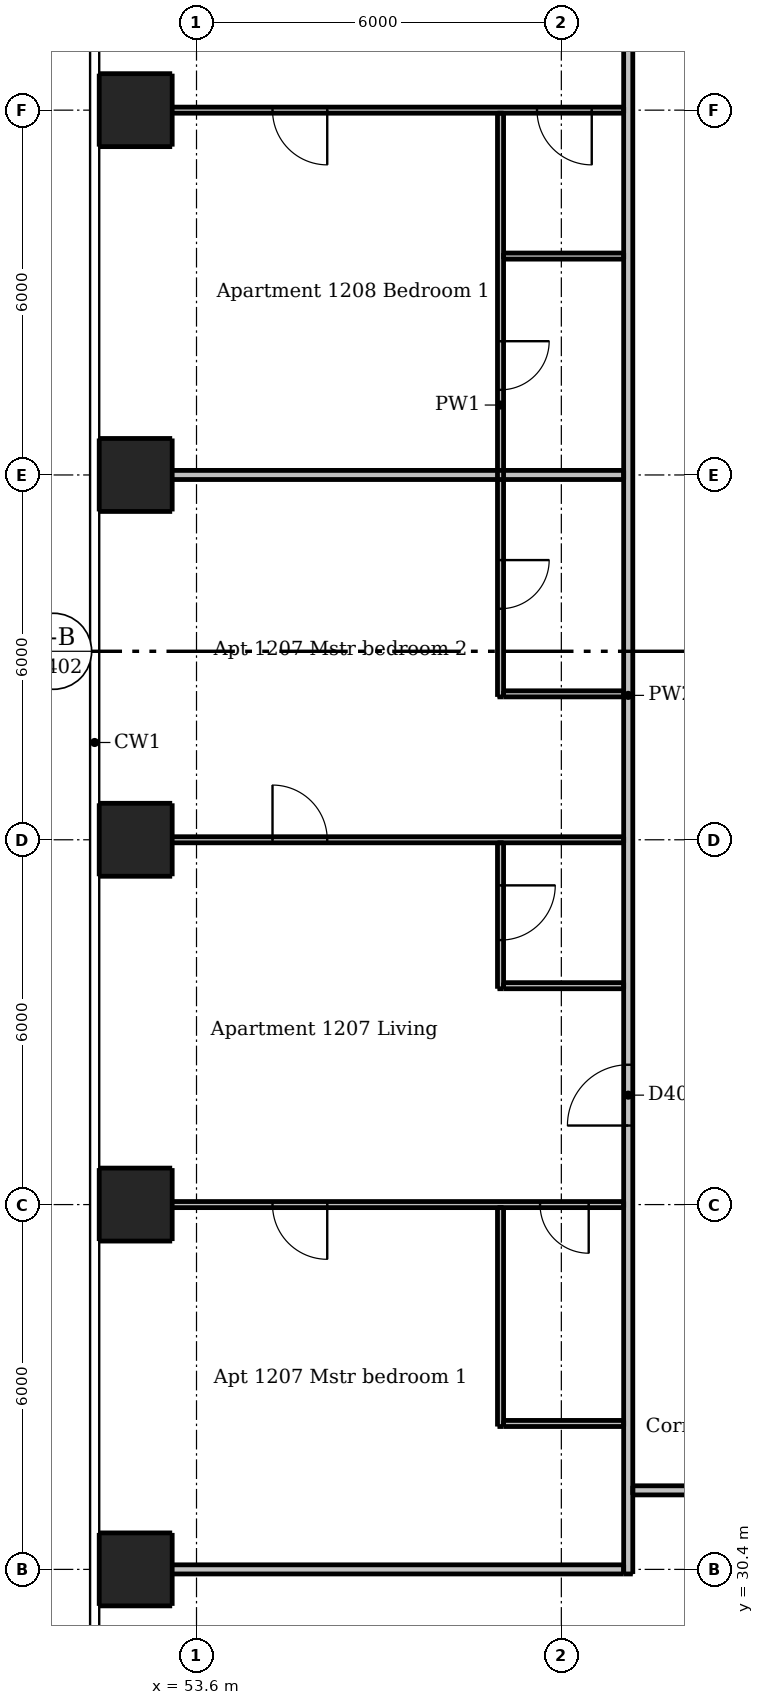
"""IFC4 building model, lengths in metres.
Left out: names, types, materials, properties, quantities, classifications, styles, units other than length and angle.
Written with IfcOpenShell. Run it as: python <this file> out.ifc"""

import sys

from ifc_helpers import new_model, si_unit, direction, frame, frame_2d, origin, origin_2d, place, context, subcontext, project, spatial, rectangle, extrude, element, fill, save


model = new_model("IFC4")
c1 = context("Model", 3, precision=1e-05, world=origin(), true_north=direction((0.0, 1.0)))
c2 = subcontext(c1, "Body", "Model", "MODEL_VIEW")
j1 = project(units=[si_unit("LENGTHUNIT", "METRE"), si_unit("PLANEANGLEUNIT", "RADIAN")], contexts=[c1])
p1 = place(None, origin())
s1 = spatial("IfcSite", under=j1, at=p1, CompositionType="ELEMENT")
p2 = place(p1, origin())
s2 = spatial("IfcBuilding", under=s1, at=p2, CompositionType="ELEMENT")
p3 = place(p2, frame((0.0, 0.0, 46.6)))
s3 = spatial("IfcBuildingStorey", under=s2, at=p3, CompositionType="ELEMENT", Elevation=46.6)
for number, where, z_axis, x_axis in (
    (1, (52.6, 30.4, 0.0), (0.0, 0.0, 1.0), (1.0, 0.0, 0.0)),
    (2, (52.6, 36.4, 0.0), (0.0, 0.0, 1.0), (1.0, 0.0, 0.0)),
    (3, (52.6, 42.4, 0.0), (0.0, 0.0, 1.0), (1.0, 0.0, 0.0)),
    (4, (52.6, 48.4, 0.0), (0.0, 0.0, 1.0), (1.0, 0.0, 0.0)),
    (5, (52.6, 54.4, 0.0), (0.0, 0.0, 1.0), (1.0, 0.0, 0.0)),
):
    element("IfcColumn", number, at=place(p3, frame(where, z_axis=z_axis, x_axis=x_axis)), inside=s3, PredefinedType="COLUMN", context=c2, shape_type="SweptSolid", body=[
        extrude(rectangle(XDim=1.2, YDim=1.2, at=origin_2d()), origin(), (0.0, 0.0, 1.0), 3.05),
    ])
p4 = place(p3, frame((58.6, 32.75, 0.0), z_axis=(0.0, 0.0, 1.0), x_axis=(0.0, 1.0, 0.0)))
e6 = element("IfcWall", 6, at=p4, inside=s3, PredefinedType="PARTITIONING", context=c2, shape_type="SweptSolid", body=[
    extrude(rectangle(XDim=3.6, YDim=0.1, at=frame_2d((1.8, 0.0))), origin(), (0.0, 0.0, 1.0), 3.05),
])
p5 = place(p3, frame((58.6, 42.35, 0.0), z_axis=(0.0, 0.0, 1.0), x_axis=(0.0, -1.0, 0.0)))
e7 = element("IfcWall", 7, at=p5, inside=s3, PredefinedType="PARTITIONING", context=c2, shape_type="SweptSolid", body=[
    extrude(rectangle(XDim=2.4, YDim=0.1, at=frame_2d((1.2, 0.0))), origin(), (0.0, 0.0, 1.0), 3.05),
])
p6 = place(p5, frame((0.7, 0.0, 0.0)))
e8 = element("IfcOpeningElement", 8, at=p6, cuts=e7, PredefinedType="OPENING", context=c2, shape_type="SweptSolid", body=[
    extrude(rectangle(XDim=0.9, YDim=2.1, at=frame_2d((0.45, 1.05))), frame((0.0, 0.06, 0.0), z_axis=(0.0, -1.0, 0.0), x_axis=(1.0, 0.0, 0.0)), (0.0, 0.0, 1.0), 0.12),
])
p7 = place(p3, frame((58.6, 54.35, 0.0), z_axis=(0.0, 0.0, 1.0), x_axis=(0.0, -1.0, 0.0)))
e9 = element("IfcWall", 9, at=p7, inside=s3, PredefinedType="PARTITIONING", context=c2, shape_type="SweptSolid", body=[
    extrude(rectangle(XDim=9.6, YDim=0.1, at=frame_2d((4.8, 0.0))), origin(), (0.0, 0.0, 1.0), 3.05),
])
p8 = place(p7, frame((7.35, 0.0, 0.0)))
e10 = element("IfcOpeningElement", 10, at=p8, cuts=e9, PredefinedType="OPENING", context=c2, shape_type="SweptSolid", body=[
    extrude(rectangle(XDim=0.8, YDim=2.1, at=frame_2d((0.4, 1.05))), frame((0.0, 0.06, 0.0), z_axis=(0.0, -1.0, 0.0), x_axis=(1.0, 0.0, 0.0)), (0.0, 0.0, 1.0), 0.12),
])
p9 = place(p7, frame((3.75, 0.0, 0.0)))
e11 = element("IfcOpeningElement", 11, at=p9, cuts=e9, PredefinedType="OPENING", context=c2, shape_type="SweptSolid", body=[
    extrude(rectangle(XDim=0.8, YDim=2.1, at=frame_2d((0.4, 1.05))), frame((0.0, 0.06, 0.0), z_axis=(0.0, -1.0, 0.0), x_axis=(1.0, 0.0, 0.0)), (0.0, 0.0, 1.0), 0.12),
])
p10 = place(p3, frame((60.625, 54.4, 0.0), z_axis=(0.0, 0.0, 1.0), x_axis=(-1.0, 0.0, 0.0)))
e12 = element("IfcWall", 12, at=p10, inside=s3, PredefinedType="PARTITIONING", context=c2, shape_type="SweptSolid", body=[
    extrude(rectangle(XDim=8.625, YDim=0.1, at=frame_2d((4.312, 0.0))), origin(), (0.0, 0.0, 1.0), 2.516),
])
p11 = place(p10, frame((0.525, 0.0, 0.0)))
e13 = element("IfcOpeningElement", 13, at=p11, cuts=e12, PredefinedType="OPENING", context=c2, shape_type="SweptSolid", body=[
    extrude(rectangle(XDim=0.9, YDim=2.1, at=frame_2d((0.45, 1.05))), frame((0.0, 0.06, 0.0), z_axis=(0.0, -1.0, 0.0), x_axis=(1.0, 0.0, 0.0)), (0.0, 0.0, 1.0), 0.12),
])
p12 = place(p10, frame((4.875, 0.0, 0.0)))
e14 = element("IfcOpeningElement", 14, at=p12, cuts=e12, PredefinedType="OPENING", context=c2, shape_type="SweptSolid", body=[
    extrude(rectangle(XDim=0.9, YDim=2.1, at=frame_2d((0.45, 1.05))), frame((0.0, 0.06, 0.0), z_axis=(0.0, -1.0, 0.0), x_axis=(1.0, 0.0, 0.0)), (0.0, 0.0, 1.0), 0.12),
])
for number, where, z_axis, x_axis in (
    (15, (58.65, 52.0, 0.0), (0.0, 0.0, 1.0), (1.0, 0.0, 0.0)),
    (16, (58.65, 44.8, 0.0), (0.0, 0.0, 1.0), (1.0, 0.0, 0.0)),
):
    element("IfcWall", number, at=place(p3, frame(where, z_axis=z_axis, x_axis=x_axis)), inside=s3, PredefinedType="PARTITIONING", context=c2, shape_type="SweptSolid", body=[
        extrude(rectangle(XDim=1.975, YDim=0.1, at=frame_2d((0.988, 0.0))), origin(), (0.0, 0.0, 1.0), 3.05),
    ])
p13 = place(p3, frame((52.0, 42.4, 0.0), z_axis=(0.0, 0.0, 1.0), x_axis=(1.0, 0.0, 0.0)))
e17 = element("IfcWall", 17, at=p13, inside=s3, PredefinedType="PARTITIONING", context=c2, shape_type="SweptSolid", body=[
    extrude(rectangle(XDim=8.625, YDim=0.1, at=frame_2d((4.312, 0.0))), origin(), (0.0, 0.0, 1.0), 2.516),
])
p14 = place(p13, frame((2.85, 0.0, 0.0)))
e18 = element("IfcOpeningElement", 18, at=p14, cuts=e17, PredefinedType="OPENING", context=c2, shape_type="SweptSolid", body=[
    extrude(rectangle(XDim=0.9, YDim=2.1, at=frame_2d((0.45, 1.05))), frame((0.0, 0.06, 0.0), z_axis=(0.0, -1.0, 0.0), x_axis=(1.0, 0.0, 0.0)), (0.0, 0.0, 1.0), 0.12),
])
p15 = place(p3, frame((58.65, 40.0, 0.0), z_axis=(0.0, 0.0, 1.0), x_axis=(1.0, 0.0, 0.0)))
e19 = element("IfcWall", 19, at=p15, inside=s3, PredefinedType="PARTITIONING", context=c2, shape_type="SweptSolid", body=[
    extrude(rectangle(XDim=1.975, YDim=0.1, at=frame_2d((0.988, 0.0))), origin(), (0.0, 0.0, 1.0), 3.05),
])
p16 = place(p3, frame((60.625, 36.4, 0.0), z_axis=(0.0, 0.0, 1.0), x_axis=(-1.0, 0.0, 0.0)))
e20 = element("IfcWall", 20, at=p16, inside=s3, PredefinedType="PARTITIONING", context=c2, shape_type="SweptSolid", body=[
    extrude(rectangle(XDim=8.625, YDim=0.1, at=frame_2d((4.312, 0.0))), origin(), (0.0, 0.0, 1.0), 2.516),
])
p17 = place(p16, frame((4.875, 0.0, 0.0)))
e21 = element("IfcOpeningElement", 21, at=p17, cuts=e20, PredefinedType="OPENING", context=c2, shape_type="SweptSolid", body=[
    extrude(rectangle(XDim=0.9, YDim=2.1, at=frame_2d((0.45, 1.05))), frame((0.0, 0.06, 0.0), z_axis=(0.0, -1.0, 0.0), x_axis=(1.0, 0.0, 0.0)), (0.0, 0.0, 1.0), 0.12),
])
p18 = place(p16, frame((0.575, 0.0, 0.0)))
e22 = element("IfcOpeningElement", 22, at=p18, cuts=e20, PredefinedType="OPENING", context=c2, shape_type="SweptSolid", body=[
    extrude(rectangle(XDim=0.8, YDim=2.1, at=frame_2d((0.4, 1.05))), frame((0.0, 0.06, 0.0), z_axis=(0.0, -1.0, 0.0), x_axis=(1.0, 0.0, 0.0)), (0.0, 0.0, 1.0), 0.12),
])
p19 = place(p3, frame((58.65, 32.8, 0.0), z_axis=(0.0, 0.0, 1.0), x_axis=(1.0, 0.0, 0.0)))
e23 = element("IfcWall", 23, at=p19, inside=s3, PredefinedType="PARTITIONING", context=c2, shape_type="SweptSolid", body=[
    extrude(rectangle(XDim=1.975, YDim=0.1, at=frame_2d((0.988, 0.0))), origin(), (0.0, 0.0, 1.0), 3.05),
])
p20 = place(p3, frame((60.7, 30.325, 0.0), z_axis=(0.0, 0.0, 1.0), x_axis=(0.0, 1.0, 0.0)))
e24 = element("IfcWall", 24, at=p20, inside=s3, PredefinedType="PARTITIONING", context=c2, shape_type="SweptSolid", body=[
    extrude(rectangle(XDim=28.9, YDim=0.15, at=frame_2d((14.45, 0.0))), origin(), (0.0, 0.0, 1.0), 3.05),
])
p21 = place(p20, frame((7.375, 0.0, 0.0)))
e25 = element("IfcOpeningElement", 25, at=p21, cuts=e24, PredefinedType="OPENING", context=c2, shape_type="SweptSolid", body=[
    extrude(rectangle(XDim=1.0, YDim=2.1, at=frame_2d((0.5, 1.05))), frame((0.0, 0.085, 0.0), z_axis=(0.0, -1.0, 0.0), x_axis=(1.0, 0.0, 0.0)), (0.0, 0.0, 1.0), 0.17),
])
p22 = place(p20, frame((26.025, 0.0, 0.0)))
e26 = element("IfcOpeningElement", 26, at=p22, cuts=e24, PredefinedType="OPENING", context=c2, shape_type="SweptSolid", body=[
    extrude(rectangle(XDim=1.0, YDim=2.1, at=frame_2d((0.5, 1.05))), frame((0.0, 0.085, 0.0), z_axis=(0.0, -1.0, 0.0), x_axis=(1.0, 0.0, 0.0)), (0.0, 0.0, 1.0), 0.17),
])
p23 = place(p3, frame((52.0, 48.4, 0.0), z_axis=(0.0, 0.0, 1.0), x_axis=(1.0, 0.0, 0.0)))
e27 = element("IfcWall", 27, at=p23, inside=s3, PredefinedType="PARTITIONING", context=c2, shape_type="SweptSolid", body=[
    extrude(rectangle(XDim=8.625, YDim=0.15, at=frame_2d((4.312, 0.0))), origin(), (0.0, 0.0, 1.0), 2.516),
])
p24 = place(p3, frame((89.525, 31.7, 0.0), z_axis=(0.0, 0.0, 1.0), x_axis=(-1.0, 0.0, 0.0)))
e28 = element("IfcWall", 28, at=p24, inside=s3, PredefinedType="PARTITIONING", context=c2, shape_type="SweptSolid", body=[
    extrude(rectangle(XDim=28.75, YDim=0.15, at=frame_2d((14.375, 0.0))), origin(), (0.0, 0.0, 1.0), 3.05),
])
p25 = place(p24, frame((24.325, 0.0, 0.0)))
e29 = element("IfcOpeningElement", 29, at=p25, cuts=e28, PredefinedType="OPENING", context=c2, shape_type="SweptSolid", body=[
    extrude(rectangle(XDim=1.0, YDim=2.1, at=frame_2d((0.5, 1.05))), frame((0.0, 0.085, 0.0), z_axis=(0.0, -1.0, 0.0), x_axis=(1.0, 0.0, 0.0)), (0.0, 0.0, 1.0), 0.17),
])
p26 = place(p24, frame((6.575, 0.0, 0.0)))
e30 = element("IfcOpeningElement", 30, at=p26, cuts=e28, PredefinedType="OPENING", context=c2, shape_type="SweptSolid", body=[
    extrude(rectangle(XDim=1.0, YDim=2.1, at=frame_2d((0.5, 1.05))), frame((0.0, 0.085, 0.0), z_axis=(0.0, -1.0, 0.0), x_axis=(1.0, 0.0, 0.0)), (0.0, 0.0, 1.0), 0.17),
])
p27 = place(p3, frame((52.0, 30.4, 0.0), z_axis=(0.0, 0.0, 1.0), x_axis=(1.0, 0.0, 0.0)))
e31 = element("IfcWall", 31, at=p27, inside=s3, PredefinedType="PARTITIONING", context=c2, shape_type="SweptSolid", body=[
    extrude(rectangle(XDim=8.625, YDim=0.15, at=frame_2d((4.312, 0.0))), origin(), (0.0, 0.0, 1.0), 2.647),
])
p28 = place(p21, origin())
e32 = element("IfcDoor", 32, at=p28, inside=s3, OperationType="SINGLE_SWING_LEFT", PredefinedType="DOOR", context=c2, shape_type="SweptSolid", body=[
    extrude(rectangle(XDim=1.0, YDim=2.1, at=frame_2d((0.5, 1.05))), frame((0.0, 0.025, 0.0), z_axis=(0.0, -1.0, 0.0), x_axis=(1.0, 0.0, 0.0)), (0.0, 0.0, 1.0), 0.05),
])
fill(e25, e32)
p29 = place(p6, origin())
e33 = element("IfcDoor", 33, at=p29, inside=s3, OperationType="SINGLE_SWING_LEFT", PredefinedType="DOOR", context=c2, shape_type="SweptSolid", body=[
    extrude(rectangle(XDim=0.9, YDim=2.1, at=frame_2d((0.45, 1.05))), frame((0.0, 0.025, 0.0), z_axis=(0.0, -1.0, 0.0), x_axis=(1.0, 0.0, 0.0)), (0.0, 0.0, 1.0), 0.05),
])
fill(e8, e33)
p30 = place(p17, origin())
e34 = element("IfcDoor", 34, at=p30, inside=s3, OperationType="SINGLE_SWING_LEFT", PredefinedType="DOOR", context=c2, shape_type="SweptSolid", body=[
    extrude(rectangle(XDim=0.9, YDim=2.1, at=frame_2d((0.45, 1.05))), frame((0.0, 0.025, 0.0), z_axis=(0.0, -1.0, 0.0), x_axis=(1.0, 0.0, 0.0)), (0.0, 0.0, 1.0), 0.05),
])
fill(e21, e34)
p31 = place(p18, origin())
e35 = element("IfcDoor", 35, at=p31, inside=s3, OperationType="SINGLE_SWING_LEFT", PredefinedType="DOOR", context=c2, shape_type="SweptSolid", body=[
    extrude(rectangle(XDim=0.8, YDim=2.1, at=frame_2d((0.4, 1.05))), frame((0.0, 0.025, 0.0), z_axis=(0.0, -1.0, 0.0), x_axis=(1.0, 0.0, 0.0)), (0.0, 0.0, 1.0), 0.05),
])
fill(e22, e35)
p32 = place(p14, origin())
e36 = element("IfcDoor", 36, at=p32, inside=s3, OperationType="SINGLE_SWING_LEFT", PredefinedType="DOOR", context=c2, shape_type="SweptSolid", body=[
    extrude(rectangle(XDim=0.9, YDim=2.1, at=frame_2d((0.45, 1.05))), frame((0.0, 0.025, 0.0), z_axis=(0.0, -1.0, 0.0), x_axis=(1.0, 0.0, 0.0)), (0.0, 0.0, 1.0), 0.05),
])
fill(e18, e36)
p33 = place(p8, origin())
e37 = element("IfcDoor", 37, at=p33, inside=s3, OperationType="SINGLE_SWING_LEFT", PredefinedType="DOOR", context=c2, shape_type="SweptSolid", body=[
    extrude(rectangle(XDim=0.8, YDim=2.1, at=frame_2d((0.4, 1.05))), frame((0.0, 0.025, 0.0), z_axis=(0.0, -1.0, 0.0), x_axis=(1.0, 0.0, 0.0)), (0.0, 0.0, 1.0), 0.05),
])
fill(e10, e37)
p34 = place(p11, origin())
e38 = element("IfcDoor", 38, at=p34, inside=s3, OperationType="SINGLE_SWING_LEFT", PredefinedType="DOOR", context=c2, shape_type="SweptSolid", body=[
    extrude(rectangle(XDim=0.9, YDim=2.1, at=frame_2d((0.45, 1.05))), frame((0.0, 0.025, 0.0), z_axis=(0.0, -1.0, 0.0), x_axis=(1.0, 0.0, 0.0)), (0.0, 0.0, 1.0), 0.05),
])
fill(e13, e38)
p35 = place(p12, origin())
e39 = element("IfcDoor", 39, at=p35, inside=s3, OperationType="SINGLE_SWING_LEFT", PredefinedType="DOOR", context=c2, shape_type="SweptSolid", body=[
    extrude(rectangle(XDim=0.9, YDim=2.1, at=frame_2d((0.45, 1.05))), frame((0.0, 0.025, 0.0), z_axis=(0.0, -1.0, 0.0), x_axis=(1.0, 0.0, 0.0)), (0.0, 0.0, 1.0), 0.05),
])
fill(e14, e39)
p36 = place(p9, origin())
e40 = element("IfcDoor", 40, at=p36, inside=s3, OperationType="SINGLE_SWING_LEFT", PredefinedType="DOOR", context=c2, shape_type="SweptSolid", body=[
    extrude(rectangle(XDim=0.8, YDim=2.1, at=frame_2d((0.4, 1.05))), frame((0.0, 0.025, 0.0), z_axis=(0.0, -1.0, 0.0), x_axis=(1.0, 0.0, 0.0)), (0.0, 0.0, 1.0), 0.05),
])
fill(e11, e40)
save(model, sys.argv[1])
